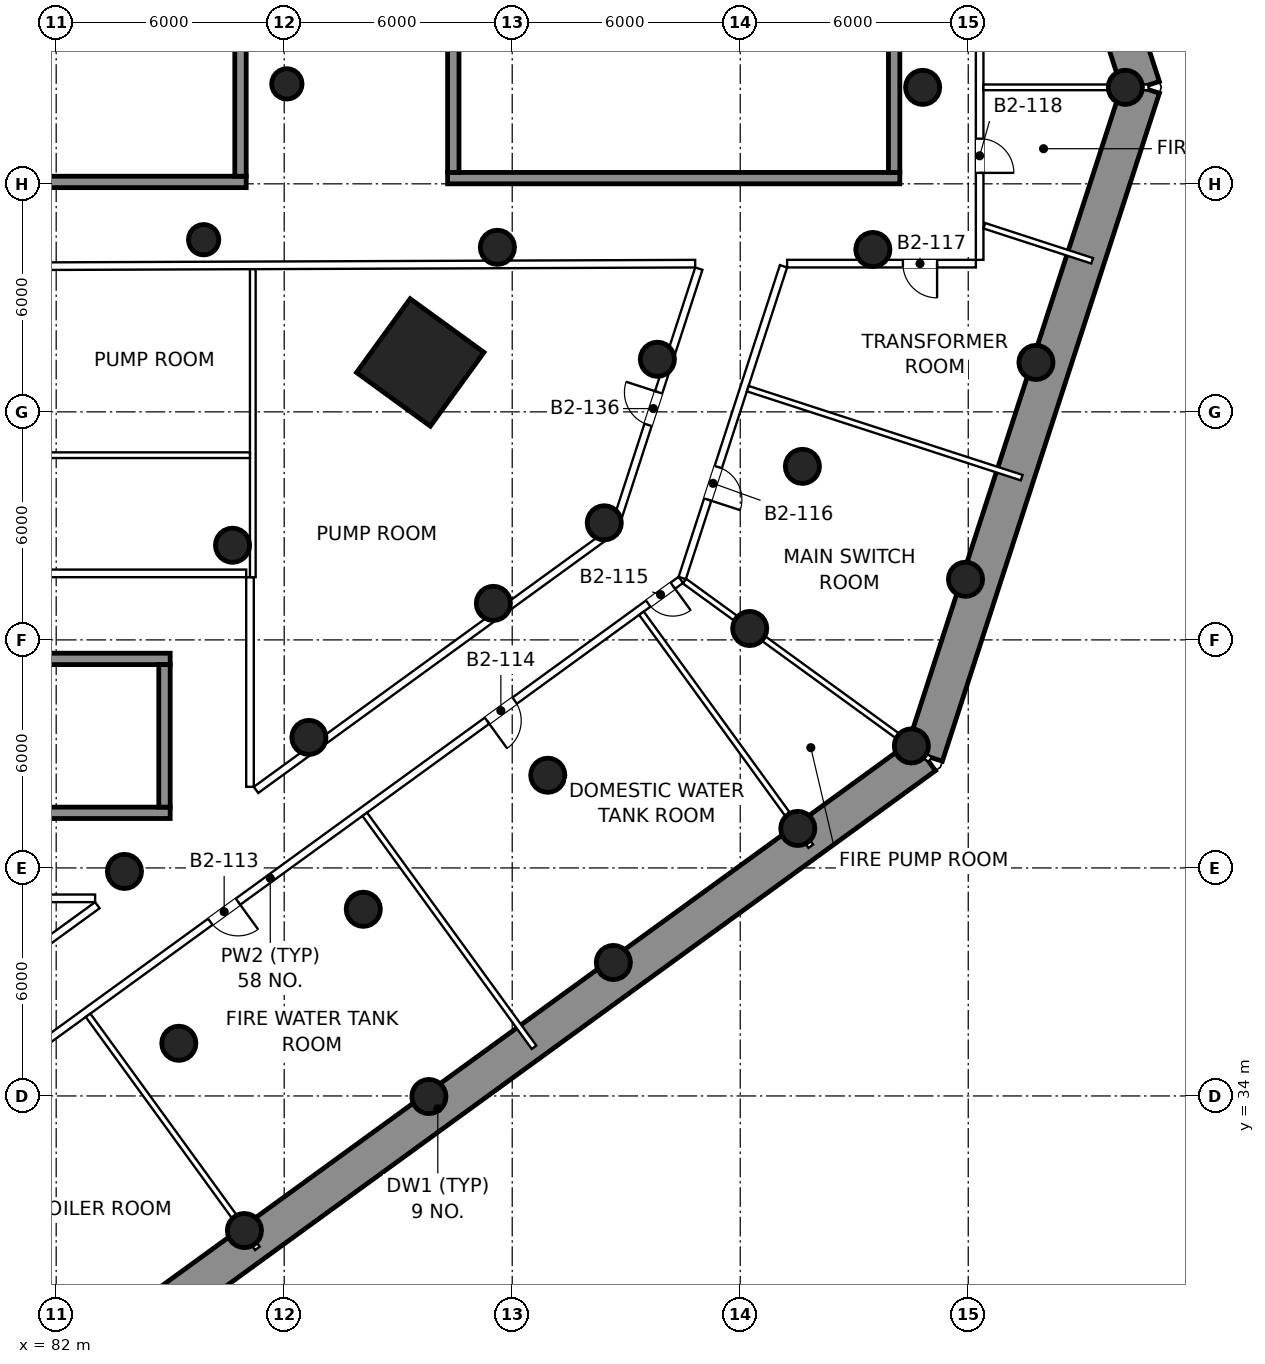
"""IFC4 building model, lengths in metres.
Left out: names, types, materials, properties, quantities, classifications, styles, units other than length and angle.
Written with IfcOpenShell. Run it as: python <this file> out.ifc"""

import sys

from ifc_helpers import new_model, si_unit, direction, frame, frame_2d, origin, origin_2d, place, context, subcontext, project, spatial, rectangle, circle, extrude, element, fill, save


model = new_model("IFC4")
c1 = context("Model", 3, precision=1e-05, world=origin(), true_north=direction((0.0, 1.0)))
c2 = subcontext(c1, "Body", "Model", "MODEL_VIEW")
j1 = project(units=[si_unit("LENGTHUNIT", "METRE"), si_unit("PLANEANGLEUNIT", "RADIAN")], contexts=[c1])
p1 = place(None, origin())
s1 = spatial("IfcSite", under=j1, at=p1, CompositionType="ELEMENT")
p2 = place(p1, origin())
s2 = spatial("IfcBuilding", under=s1, at=p2, CompositionType="ELEMENT")
p3 = place(p2, frame((0.0, 0.0, -10.0)))
s3 = spatial("IfcBuildingStorey", under=s2, at=p3, CompositionType="ELEMENT", Elevation=-10.0)
p4 = place(p3, frame((110.554, 60.539, 0.0), z_axis=(0.0, 0.0, 1.0), x_axis=(-0.309001835939, -0.951061441436, 0.0)))
e1 = element("IfcWall", 1, at=p4, inside=s3, PredefinedType="SOLIDWALL", context=c2, shape_type="SweptSolid", body=[
    extrude(rectangle(XDim=18.481, YDim=1.0, at=frame_2d((9.241, 0.0))), origin(), (0.0, 0.0, 1.0), 4.65),
])
p5 = place(p3, frame((104.844, 42.963, 0.0), z_axis=(0.0, 0.0, 1.0), x_axis=(-0.809018883304, -0.587782652396, 0.0)))
e2 = element("IfcWall", 2, at=p5, inside=s3, PredefinedType="SOLIDWALL", context=c2, shape_type="SweptSolid", body=[
    extrude(rectangle(XDim=31.647, YDim=1.0, at=frame_2d((15.823, 0.0))), origin(), (0.0, 0.0, 1.0), 4.65),
])
p6 = place(p3, frame((101.794, 87.5, 0.0), z_axis=(0.0, 0.0, 1.0), x_axis=(0.309015382076, -0.951057040161, 0.0)))
e3 = element("IfcWall", 3, at=p6, inside=s3, PredefinedType="SOLIDWALL", context=c2, shape_type="SweptSolid", body=[
    extrude(rectangle(XDim=28.348, YDim=1.0, at=frame_2d((14.174, 0.0))), origin(), (0.0, 0.0, 1.0), 4.65),
])
p7 = place(p3, frame((86.64, 48.49, 0.0), z_axis=(0.0, 0.0, 1.0), x_axis=(1.0, 0.0, 0.0)))
e4 = element("IfcColumn", 4, at=p7, inside=s3, PredefinedType="COLUMN", context=c2, shape_type="SweptSolid", body=[
    extrude(circle(Radius=0.45, at=origin_2d()), origin(), (0.0, 0.0, 1.0), 5.0),
])
p8 = place(p3, frame((91.58, 53.3, 0.0), z_axis=(0.0, 0.0, 1.0), x_axis=(0.809016994375, -0.587785252292, 0.0)))
e5 = element("IfcColumn", 5, at=p8, inside=s3, PredefinedType="COLUMN", context=c2, shape_type="SweptSolid", body=[
    extrude(rectangle(XDim=2.4, YDim=2.4, at=origin_2d()), origin(), (0.0, 0.0, 1.0), 5.0),
])
p9 = place(p3, frame((93.61, 56.33, 0.0), z_axis=(0.0, 0.0, 1.0), x_axis=(1.0, 0.0, 0.0)))
e6 = element("IfcColumn", 6, at=p9, inside=s3, PredefinedType="COLUMN", context=c2, shape_type="SweptSolid", body=[
    extrude(circle(Radius=0.45, at=origin_2d()), origin(), (0.0, 0.0, 1.0), 5.0),
])
for number, where, z_axis, x_axis in (
    (7, (85.88, 56.53, 0.0), (0.0, 0.0, 1.0), (1.0, 0.0, 0.0)),
    (8, (88.07, 60.63, 0.0), (0.0, 0.0, 1.0), (1.0, 0.0, 0.0)),
):
    element("IfcColumn", number, at=place(p3, frame(where, z_axis=z_axis, x_axis=x_axis)), inside=s3, PredefinedType="COLUMN", context=c2, shape_type="SweptSolid", body=[
        extrude(circle(Radius=0.4, at=origin_2d()), origin(), (0.0, 0.0, 1.0), 5.0),
    ])
for number, where, z_axis, x_axis in (
    (9, (86.953, 30.459, 0.0), (0.0, 0.0, 1.0), (1.0, 0.0, 0.0)),
    (10, (91.807, 33.985, 0.0), (0.0, 0.0, 1.0), (1.0, 0.0, 0.0)),
    (11, (96.661, 37.512, 0.0), (0.0, 0.0, 1.0), (1.0, 0.0, 0.0)),
    (12, (101.515, 41.039, 0.0), (0.0, 0.0, 1.0), (1.0, 0.0, 0.0)),
    (13, (104.503, 43.21, 0.0), (0.0, 0.0, 1.0), (1.0, 0.0, 0.0)),
    (14, (105.928, 47.595, 0.0), (0.0, 0.0, 1.0), (1.0, 0.0, 0.0)),
    (15, (107.782, 53.301, 0.0), (0.0, 0.0, 1.0), (1.0, 0.0, 0.0)),
    (16, (110.134, 60.539, 0.0), (0.0, 0.0, 1.0), (1.0, 0.0, 0.0)),
    (17, (85.227, 35.386, 0.0), (0.0, 0.0, 1.0), (1.0, 0.0, 0.0)),
    (18, (90.081, 38.912, 0.0), (0.0, 0.0, 1.0), (1.0, 0.0, 0.0)),
    (19, (94.936, 42.439, 0.0), (0.0, 0.0, 1.0), (1.0, 0.0, 0.0)),
    (20, (100.25, 46.3, 0.0), (0.0, 0.0, 1.0), (1.0, 0.0, 0.0)),
    (21, (101.636, 50.566, 0.0), (0.0, 0.0, 1.0), (1.0, 0.0, 0.0)),
    (22, (103.49, 56.273, 0.0), (0.0, 0.0, 1.0), (1.0, 0.0, 0.0)),
    (23, (104.8, 60.539, 0.0), (0.0, 0.0, 1.0), (1.0, 0.0, 0.0)),
    (24, (83.796, 39.908, 0.0), (0.0, 0.0, 1.0), (1.0, 0.0, 0.0)),
    (25, (88.65, 43.434, 0.0), (0.0, 0.0, 1.0), (1.0, 0.0, 0.0)),
    (26, (93.504, 46.961, 0.0), (0.0, 0.0, 1.0), (1.0, 0.0, 0.0)),
    (27, (96.422, 49.081, 0.0), (0.0, 0.0, 1.0), (1.0, 0.0, 0.0)),
    (28, (97.82, 53.384, 0.0), (0.0, 0.0, 1.0), (1.0, 0.0, 0.0)),
):
    element("IfcColumn", number, at=place(p3, frame(where, z_axis=z_axis, x_axis=x_axis)), inside=s3, PredefinedType="COLUMN", context=c2, shape_type="SweptSolid", body=[
        extrude(circle(Radius=0.45, at=origin_2d()), origin(), (0.0, 0.0, 1.0), 5.0),
    ])
p10 = place(p3, frame((75.1, 58.05, 0.0), z_axis=(0.0, 0.0, 1.0), x_axis=(1.0, 0.0, 0.0)))
e29 = element("IfcWall", 29, at=p10, inside=s3, PredefinedType="SHEAR", context=c2, shape_type="SweptSolid", body=[
    extrude(rectangle(XDim=11.9, YDim=0.3, at=frame_2d((5.95, 0.0))), origin(), (0.0, 0.0, 1.0), 5.0),
])
p11 = place(p3, frame((86.85, 58.2, 0.0), z_axis=(0.0, 0.0, 1.0), x_axis=(0.0, 1.0, 0.0)))
e30 = element("IfcWall", 30, at=p11, inside=s3, PredefinedType="SHEAR", context=c2, shape_type="SweptSolid", body=[
    extrude(rectangle(XDim=3.35, YDim=0.3, at=frame_2d((1.675, 0.0))), origin(), (0.0, 0.0, 1.0), 5.0),
])
for number, where, z_axis, x_axis in (
    (31, (73.1, 41.45, 0.0), (0.0, 0.0, 1.0), (1.0, 0.0, 0.0)),
    (32, (73.1, 45.5, 0.0), (0.0, 0.0, 1.0), (1.0, 0.0, 0.0)),
):
    element("IfcWall", number, at=place(p3, frame(where, z_axis=z_axis, x_axis=x_axis)), inside=s3, PredefinedType="SHEAR", context=c2, shape_type="SweptSolid", body=[
        extrude(rectangle(XDim=11.9, YDim=0.3, at=frame_2d((5.95, 0.0))), origin(), (0.0, 0.0, 1.0), 5.0),
    ])
p12 = place(p3, frame((84.85, 41.6, 0.0), z_axis=(0.0, 0.0, 1.0), x_axis=(0.0, 1.0, 0.0)))
e33 = element("IfcWall", 33, at=p12, inside=s3, PredefinedType="SHEAR", context=c2, shape_type="SweptSolid", body=[
    extrude(rectangle(XDim=3.75, YDim=0.3, at=frame_2d((1.875, 0.0))), origin(), (0.0, 0.0, 1.0), 5.0),
])
p13 = place(p3, frame((92.3, 58.15, 0.0), z_axis=(0.0, 0.0, 1.0), x_axis=(1.0, 0.0, 0.0)))
e34 = element("IfcWall", 34, at=p13, inside=s3, PredefinedType="SHEAR", context=c2, shape_type="SweptSolid", body=[
    extrude(rectangle(XDim=11.9, YDim=0.3, at=frame_2d((5.95, 0.0))), origin(), (0.0, 0.0, 1.0), 5.0),
])
for number, where, z_axis, x_axis in (
    (35, (92.45, 58.3, 0.0), (0.0, 0.0, 1.0), (0.0, 1.0, 0.0)),
    (36, (104.05, 58.3, 0.0), (0.0, 0.0, 1.0), (0.0, 1.0, 0.0)),
):
    element("IfcWall", number, at=place(p3, frame(where, z_axis=z_axis, x_axis=x_axis)), inside=s3, PredefinedType="SHEAR", context=c2, shape_type="SweptSolid", body=[
        extrude(rectangle(XDim=3.35, YDim=0.3, at=frame_2d((1.675, 0.0))), origin(), (0.0, 0.0, 1.0), 5.0),
    ])
p14 = place(p3, frame((106.3, 63.95, 0.0), z_axis=(0.0, 0.0, 1.0), x_axis=(0.0, -1.0, 0.0)))
e37 = element("IfcWall", 37, at=p14, inside=s3, PredefinedType="PARTITIONING", context=c2, shape_type="SweptSolid", body=[
    extrude(rectangle(XDim=7.95, YDim=0.2, at=frame_2d((3.975, 0.0))), origin(), (0.0, 0.0, 1.0), 4.65),
])
p15 = place(p14, frame((4.762, 0.0, 0.0)))
e38 = element("IfcOpeningElement", 38, at=p15, cuts=e37, PredefinedType="OPENING", context=c2, shape_type="SweptSolid", body=[
    extrude(rectangle(XDim=0.9, YDim=2.1, at=frame_2d((0.45, 1.05))), frame((0.0, 0.11, 0.0), z_axis=(0.0, -1.0, 0.0), x_axis=(1.0, 0.0, 0.0)), (0.0, 0.0, 1.0), 0.22),
])
p16 = place(p3, frame((106.2, 55.9, 0.0), z_axis=(0.0, 0.0, 1.0), x_axis=(-1.0, 0.0, 0.0)))
e39 = element("IfcWall", 39, at=p16, inside=s3, PredefinedType="PARTITIONING", context=c2, shape_type="SweptSolid", body=[
    extrude(rectangle(XDim=4.966, YDim=0.2, at=frame_2d((2.483, 0.0))), origin(), (0.0, 0.0, 1.0), 3.95),
])
p17 = place(p16, frame((1.02, 0.0, 0.0)))
e40 = element("IfcOpeningElement", 40, at=p17, cuts=e39, PredefinedType="OPENING", context=c2, shape_type="SweptSolid", body=[
    extrude(rectangle(XDim=0.9, YDim=2.1, at=frame_2d((0.45, 1.05))), frame((0.0, 0.11, 0.0), z_axis=(0.0, -1.0, 0.0), x_axis=(1.0, 0.0, 0.0)), (0.0, 0.0, 1.0), 0.22),
])
p18 = place(p3, frame((101.139, 55.831, 0.0), z_axis=(0.0, 0.0, 1.0), x_axis=(-0.309050865735, -0.951045510156, 0.0)))
e41 = element("IfcWall", 41, at=p18, inside=s3, PredefinedType="PARTITIONING", context=c2, shape_type="SweptSolid", body=[
    extrude(rectangle(XDim=8.624, YDim=0.2, at=frame_2d((4.312, 0.0))), origin(), (0.0, 0.0, 1.0), 4.65),
])
p19 = place(p18, frame((5.555, 0.0, 0.0)))
e42 = element("IfcOpeningElement", 42, at=p19, cuts=e41, PredefinedType="OPENING", context=c2, shape_type="SweptSolid", body=[
    extrude(rectangle(XDim=0.9, YDim=2.1, at=frame_2d((0.45, 1.05))), frame((0.0, 0.11, 0.0), z_axis=(0.0, -1.0, 0.0), x_axis=(1.0, 0.0, 0.0)), (0.0, 0.0, 1.0), 0.22),
])
p20 = place(p3, frame((98.437, 47.579, 0.0), z_axis=(0.0, 0.0, 1.0), x_axis=(-0.809016646189, -0.587785731529, 0.0)))
e43 = element("IfcWall", 43, at=p20, inside=s3, PredefinedType="PARTITIONING", context=c2, shape_type="SweptSolid", body=[
    extrude(rectangle(XDim=26.708, YDim=0.2, at=frame_2d((13.354, 0.0))), origin(), (0.0, 0.0, 1.0), 4.65),
])
p21 = place(p20, frame((22.597, 0.0, 0.0)))
e44 = element("IfcOpeningElement", 44, at=p21, cuts=e43, PredefinedType="OPENING", context=c2, shape_type="SweptSolid", body=[
    extrude(rectangle(XDim=0.9, YDim=2.1, at=frame_2d((0.45, 1.05))), frame((0.0, 0.11, 0.0), z_axis=(0.0, -1.0, 0.0), x_axis=(1.0, 0.0, 0.0)), (0.0, 0.0, 1.0), 0.22),
])
p22 = place(p20, frame((14.404, 0.0, 0.0)))
e45 = element("IfcOpeningElement", 45, at=p22, cuts=e43, PredefinedType="OPENING", context=c2, shape_type="SweptSolid", body=[
    extrude(rectangle(XDim=0.9, YDim=2.1, at=frame_2d((0.45, 1.05))), frame((0.0, 0.11, 0.0), z_axis=(0.0, -1.0, 0.0), x_axis=(1.0, 0.0, 0.0)), (0.0, 0.0, 1.0), 0.22),
])
p23 = place(p20, frame((5.404, 0.0, 0.0)))
e46 = element("IfcOpeningElement", 46, at=p23, cuts=e43, PredefinedType="OPENING", context=c2, shape_type="SweptSolid", body=[
    extrude(rectangle(XDim=0.9, YDim=2.1, at=frame_2d((0.45, 1.05))), frame((0.0, 0.11, 0.0), z_axis=(0.0, -1.0, 0.0), x_axis=(1.0, 0.0, 0.0)), (0.0, 0.0, 1.0), 0.22),
])
p24 = place(p20, frame((0.261, 0.0, 0.0)))
e47 = element("IfcOpeningElement", 47, at=p24, cuts=e43, PredefinedType="OPENING", context=c2, shape_type="SweptSolid", body=[
    extrude(rectangle(XDim=0.8, YDim=2.1, at=frame_2d((0.4, 1.05))), frame((0.0, 0.11, 0.0), z_axis=(0.0, -1.0, 0.0), x_axis=(1.0, 0.0, 0.0)), (0.0, 0.0, 1.0), 0.22),
])
p25 = place(p3, frame((96.687, 48.927, 0.0), z_axis=(0.0, 0.0, 1.0), x_axis=(0.309000124439, 0.951061997504, 0.0)))
e48 = element("IfcWall", 48, at=p25, inside=s3, PredefinedType="PARTITIONING", context=c2, shape_type="SweptSolid", body=[
    extrude(rectangle(XDim=7.194, YDim=0.2, at=frame_2d((3.597, 0.0))), origin(), (0.0, 0.0, 1.0), 3.95),
])
p26 = place(p25, frame((2.872, 0.0, 0.0)))
e49 = element("IfcOpeningElement", 49, at=p26, cuts=e48, PredefinedType="OPENING", context=c2, shape_type="SweptSolid", body=[
    extrude(rectangle(XDim=0.9, YDim=2.1, at=frame_2d((0.45, 1.05))), frame((0.0, 0.11, 0.0), z_axis=(0.0, -1.0, 0.0), x_axis=(1.0, 0.0, 0.0)), (0.0, 0.0, 1.0), 0.22),
])
p27 = place(p3, frame((98.815, 55.899, 0.0), z_axis=(0.0, 0.0, 1.0), x_axis=(-0.999992570732, -0.003854670107, 0.0)))
e50 = element("IfcWall", 50, at=p27, inside=s3, PredefinedType="PARTITIONING", context=c2, shape_type="SweptSolid", body=[
    extrude(rectangle(XDim=25.715, YDim=0.2, at=frame_2d((12.857, 0.0))), origin(), (0.0, 0.0, 1.0), 3.75),
])
p28 = place(p27, frame((18.278, 0.0, 0.0)))
e51 = element("IfcOpeningElement", 51, at=p28, cuts=e50, PredefinedType="OPENING", context=c2, shape_type="SweptSolid", body=[
    extrude(rectangle(XDim=0.9, YDim=2.1, at=frame_2d((0.45, 1.05))), frame((0.0, 0.11, 0.0), z_axis=(0.0, -1.0, 0.0), x_axis=(1.0, 0.0, 0.0)), (0.0, 0.0, 1.0), 0.22),
])
p29 = place(p3, frame((71.15, 47.75, 0.0), z_axis=(0.0, 0.0, 1.0), x_axis=(1.0, 0.0, 0.0)))
e52 = element("IfcWall", 52, at=p29, inside=s3, PredefinedType="PARTITIONING", context=c2, shape_type="SweptSolid", body=[
    extrude(rectangle(XDim=15.85, YDim=0.2, at=frame_2d((7.925, 0.0))), origin(), (0.0, 0.0, 1.0), 3.85),
])
p30 = place(p29, frame((7.475, 0.0, 0.0)))
e53 = element("IfcOpeningElement", 53, at=p30, cuts=e52, PredefinedType="OPENING", context=c2, shape_type="SweptSolid", body=[
    extrude(rectangle(XDim=0.9, YDim=2.1, at=frame_2d((0.45, 1.05))), frame((0.0, 0.11, 0.0), z_axis=(0.0, -1.0, 0.0), x_axis=(1.0, 0.0, 0.0)), (0.0, 0.0, 1.0), 0.22),
])
p31 = place(p3, frame((87.1, 47.65, 0.0), z_axis=(0.0, 0.0, 1.0), x_axis=(0.0, -1.0, 0.0)))
e54 = element("IfcWall", 54, at=p31, inside=s3, PredefinedType="PARTITIONING", context=c2, shape_type="SweptSolid", body=[
    extrude(rectangle(XDim=5.516, YDim=0.2, at=frame_2d((2.758, 0.0))), origin(), (0.0, 0.0, 1.0), 3.95),
])
p32 = place(p3, frame((87.259, 42.053, 0.0), z_axis=(0.0, 0.0, 1.0), x_axis=(0.809017904923, 0.587783999028, 0.0)))
e55 = element("IfcWall", 55, at=p32, inside=s3, PredefinedType="PARTITIONING", context=c2, shape_type="SweptSolid", body=[
    extrude(rectangle(XDim=11.609, YDim=0.2, at=frame_2d((5.805, 0.0))), origin(), (0.0, 0.0, 1.0), 3.95),
])
p33 = place(p3, frame((76.148, 33.98, 0.0), z_axis=(0.0, 0.0, 1.0), x_axis=(0.809015553327, 0.58778723572, 0.0)))
e56 = element("IfcWall", 56, at=p33, inside=s3, PredefinedType="PARTITIONING", context=c2, shape_type="SweptSolid", body=[
    extrude(rectangle(XDim=8.573, YDim=0.2, at=frame_2d((4.286, 0.0))), origin(), (0.0, 0.0, 1.0), 3.95),
])
p34 = place(p33, frame((4.483, 0.0, 0.0)))
e57 = element("IfcOpeningElement", 57, at=p34, cuts=e56, PredefinedType="OPENING", context=c2, shape_type="SweptSolid", body=[
    extrude(rectangle(XDim=0.9, YDim=2.1, at=frame_2d((0.45, 1.05))), frame((0.0, 0.11, 0.0), z_axis=(0.0, -1.0, 0.0), x_axis=(1.0, 0.0, 0.0)), (0.0, 0.0, 1.0), 0.22),
])
p35 = place(p3, frame((83.024, 39.2, 0.0), z_axis=(0.0, 0.0, 1.0), x_axis=(-1.0, 0.0, 0.0)))
e58 = element("IfcWall", 58, at=p35, inside=s3, PredefinedType="PARTITIONING", context=c2, shape_type="SweptSolid", body=[
    extrude(rectangle(XDim=11.875, YDim=0.2, at=frame_2d((5.937, 0.0))), origin(), (0.0, 0.0, 1.0), 3.95),
])
p36 = place(p35, frame((8.577, 0.0, 0.0)))
e59 = element("IfcOpeningElement", 59, at=p36, cuts=e58, PredefinedType="OPENING", context=c2, shape_type="SweptSolid", body=[
    extrude(rectangle(XDim=0.9, YDim=2.1, at=frame_2d((0.45, 1.05))), frame((0.0, 0.11, 0.0), z_axis=(0.0, -1.0, 0.0), x_axis=(1.0, 0.0, 0.0)), (0.0, 0.0, 1.0), 0.22),
])
p37 = place(p3, frame((104.997, 42.851, 0.0), z_axis=(0.0, 0.0, 1.0), x_axis=(-0.809022705267, 0.587777391843, 0.0)))
e60 = element("IfcWall", 60, at=p37, inside=s3, PredefinedType="PARTITIONING", context=c2, shape_type="SweptSolid", body=[
    extrude(rectangle(XDim=7.99, YDim=0.15, at=frame_2d((3.995, 0.0))), origin(), (0.0, 0.0, 1.0), 4.65),
])
p38 = place(p3, frame((110.744, 60.539, 0.0), z_axis=(0.0, 0.0, 1.0), x_axis=(-1.0, 0.0, 0.0)))
e61 = element("IfcWall", 61, at=p38, inside=s3, PredefinedType="PARTITIONING", context=c2, shape_type="SweptSolid", body=[
    extrude(rectangle(XDim=4.344, YDim=0.15, at=frame_2d((2.172, 0.0))), origin(), (0.0, 0.0, 1.0), 4.65),
])
p39 = place(p3, frame((87.294, 29.99, 0.0), z_axis=(0.0, 0.0, 1.0), x_axis=(-0.587800109381, 0.80900619986, 0.0)))
e62 = element("IfcWall", 62, at=p39, inside=s3, PredefinedType="PARTITIONING", context=c2, shape_type="SweptSolid", body=[
    extrude(rectangle(XDim=7.58, YDim=0.15, at=frame_2d((3.79, 0.0))), origin(), (0.0, 0.0, 1.0), 3.95),
])
p40 = place(p3, frame((94.575, 35.28, 0.0), z_axis=(0.0, 0.0, 1.0), x_axis=(-0.587779028788, 0.809021515979, 0.0)))
e63 = element("IfcWall", 63, at=p40, inside=s3, PredefinedType="PARTITIONING", context=c2, shape_type="SweptSolid", body=[
    extrude(rectangle(XDim=7.58, YDim=0.15, at=frame_2d((3.79, 0.0))), origin(), (0.0, 0.0, 1.0), 3.95),
])
for number, where, z_axis, x_axis in (
    (64, (101.856, 40.57, 0.0), (0.0, 0.0, 1.0), (-0.588, 0.809, 0.0)),
    (65, (107.406, 50.269, 0.0), (0.0, 0.0, 1.0), (-0.951, 0.309, 0.0)),
):
    element("IfcWall", number, at=place(p3, frame(where, z_axis=z_axis, x_axis=x_axis)), inside=s3, PredefinedType="PARTITIONING", context=c2, shape_type="SweptSolid", body=[
        extrude(rectangle(XDim=7.58, YDim=0.15, at=frame_2d((3.79, 0.0))), origin(), (0.0, 0.0, 1.0), 3.95),
    ])
p41 = place(p3, frame((109.26, 55.975, 0.0), z_axis=(0.0, 0.0, 1.0), x_axis=(-0.951061728044, 0.309000953802, 0.0)))
e66 = element("IfcWall", 66, at=p41, inside=s3, PredefinedType="PARTITIONING", context=c2, shape_type="SweptSolid", body=[
    extrude(rectangle(XDim=2.983, YDim=0.15, at=frame_2d((1.492, 0.0))), origin(), (0.0, 0.0, 1.0), 4.65),
])
p42 = place(p3, frame((87.174, 47.65, 0.0), z_axis=(0.0, 0.0, 1.0), x_axis=(0.0, 1.0, 0.0)))
e67 = element("IfcWall", 67, at=p42, inside=s3, PredefinedType="PARTITIONING", context=c2, shape_type="SweptSolid", body=[
    extrude(rectangle(XDim=8.104, YDim=0.15, at=frame_2d((4.052, 0.0))), origin(), (0.0, 0.0, 1.0), 3.95),
])
p43 = place(p3, frame((71.15, 50.86, 0.0), z_axis=(0.0, 0.0, 1.0), x_axis=(1.0, 0.0, 0.0)))
e68 = element("IfcWall", 68, at=p43, inside=s3, PredefinedType="PARTITIONING", context=c2, shape_type="SweptSolid", body=[
    extrude(rectangle(XDim=15.949, YDim=0.15, at=frame_2d((7.975, 0.0))), origin(), (0.0, 0.0, 1.0), 3.85),
])
p44 = place(p22, origin())
e69 = element("IfcDoor", 69, at=p44, inside=s3, OperationType="SINGLE_SWING_LEFT", PredefinedType="DOOR", context=c2, shape_type="SweptSolid", body=[
    extrude(rectangle(XDim=0.9, YDim=2.1, at=frame_2d((0.45, 1.05))), frame((0.0, 0.025, 0.0), z_axis=(0.0, -1.0, 0.0), x_axis=(1.0, 0.0, 0.0)), (0.0, 0.0, 1.0), 0.05),
])
fill(e45, e69)
p45 = place(p23, origin())
e70 = element("IfcDoor", 70, at=p45, inside=s3, OperationType="SINGLE_SWING_RIGHT", PredefinedType="DOOR", context=c2, shape_type="SweptSolid", body=[
    extrude(rectangle(XDim=0.9, YDim=2.1, at=frame_2d((0.45, 1.05))), frame((0.0, 0.025, 0.0), z_axis=(0.0, -1.0, 0.0), x_axis=(1.0, 0.0, 0.0)), (0.0, 0.0, 1.0), 0.05),
])
fill(e46, e70)
p46 = place(p24, origin())
e71 = element("IfcDoor", 71, at=p46, inside=s3, OperationType="SINGLE_SWING_LEFT", PredefinedType="DOOR", context=c2, shape_type="SweptSolid", body=[
    extrude(rectangle(XDim=0.8, YDim=2.1, at=frame_2d((0.4, 1.05))), frame((0.0, 0.025, 0.0), z_axis=(0.0, -1.0, 0.0), x_axis=(1.0, 0.0, 0.0)), (0.0, 0.0, 1.0), 0.05),
])
fill(e47, e71)
p47 = place(p19, origin())
e72 = element("IfcDoor", 72, at=p47, inside=s3, OperationType="SINGLE_SWING_RIGHT", PredefinedType="DOOR", context=c2, shape_type="SweptSolid", body=[
    extrude(rectangle(XDim=0.9, YDim=2.1, at=frame_2d((0.45, 1.05))), frame((0.0, 0.025, 0.0), z_axis=(0.0, -1.0, 0.0), x_axis=(1.0, 0.0, 0.0)), (0.0, 0.0, 1.0), 0.05),
])
fill(e42, e72)
p48 = place(p17, origin())
e73 = element("IfcDoor", 73, at=p48, inside=s3, OperationType="SINGLE_SWING_LEFT", PredefinedType="DOOR", context=c2, shape_type="SweptSolid", body=[
    extrude(rectangle(XDim=0.9, YDim=2.1, at=frame_2d((0.45, 1.05))), frame((0.0, 0.025, 0.0), z_axis=(0.0, -1.0, 0.0), x_axis=(1.0, 0.0, 0.0)), (0.0, 0.0, 1.0), 0.05),
])
fill(e40, e73)
p49 = place(p15, origin())
e74 = element("IfcDoor", 74, at=p49, inside=s3, OperationType="SINGLE_SWING_RIGHT", PredefinedType="DOOR", context=c2, shape_type="SweptSolid", body=[
    extrude(rectangle(XDim=0.9, YDim=2.1, at=frame_2d((0.45, 1.05))), frame((0.0, 0.025, 0.0), z_axis=(0.0, -1.0, 0.0), x_axis=(1.0, 0.0, 0.0)), (0.0, 0.0, 1.0), 0.05),
])
fill(e38, e74)
p50 = place(p26, origin())
e75 = element("IfcDoor", 75, at=p50, inside=s3, OperationType="SINGLE_SWING_RIGHT", PredefinedType="DOOR", context=c2, shape_type="SweptSolid", body=[
    extrude(rectangle(XDim=0.9, YDim=2.1, at=frame_2d((0.45, 1.05))), frame((0.0, 0.025, 0.0), z_axis=(0.0, -1.0, 0.0), x_axis=(1.0, 0.0, 0.0)), (0.0, 0.0, 1.0), 0.05),
])
fill(e49, e75)
save(model, sys.argv[1])
